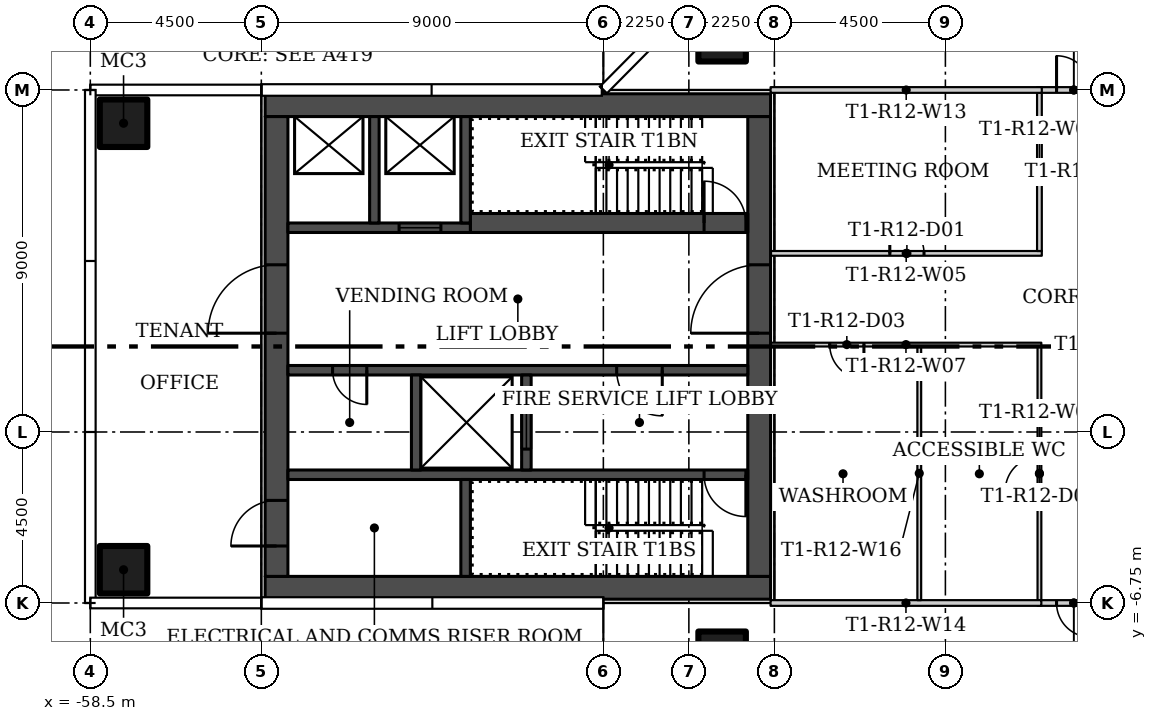
"""IFC4 building model, lengths in metres.
Left out: names, types, materials, properties, quantities, classifications, styles, units other than length and angle.
Written with IfcOpenShell. Run it as: python <this file> out.ifc"""

import sys

from ifc_helpers import new_model, si_unit, direction, frame, frame_2d, origin, origin_2d, place, context, subcontext, project, spatial, rectangle, hollow_rectangle, extrude, element, fill, save


model = new_model("IFC4")
c1 = context("Model", 3, precision=1e-05, world=origin(), true_north=direction((0.0, 1.0)))
c2 = subcontext(c1, "Body", "Model", "MODEL_VIEW")
j1 = project(units=[si_unit("LENGTHUNIT", "METRE"), si_unit("PLANEANGLEUNIT", "RADIAN")], contexts=[c1])
p1 = place(None, origin())
s1 = spatial("IfcSite", under=j1, at=p1, CompositionType="ELEMENT")
p2 = place(p1, origin())
s2 = spatial("IfcBuilding", under=s1, at=p2, CompositionType="ELEMENT")
p3 = place(p2, frame((0.0, 0.0, 113.1)))
s3 = spatial("IfcBuildingStorey", under=s2, at=p3, CompositionType="ELEMENT", Elevation=113.1)
for number, where in (
    (1, (-41.875, 8.125, 0.0)),
    (2, (-41.875, -8.125, 0.0)),
    (3, (-57.625, -5.875, 0.0)),
    (4, (-57.625, 5.875, 0.0)),
):
    element("IfcColumn", number, at=place(p3, frame(where)), inside=s3, PredefinedType="COLUMN", context=c2, shape_type="SweptSolid", body=[
        extrude(hollow_rectangle(XDim=1.25, YDim=1.25, WallThickness=0.05, at=origin_2d()), origin(), (0.0, 0.0, 1.0), 3.55),
    ])
p4 = place(p3, frame((-40.6, 2.45, 0.0)))
e5 = element("IfcWall", 5, at=p4, inside=s3, PredefinedType="PARTITIONING", context=c2, shape_type="SweptSolid", body=[
    extrude(rectangle(XDim=7.137, YDim=0.125, at=frame_2d((3.569, 0.0))), origin(), (0.0, 0.0, 1.0), 3.55),
])
p5 = place(p4, frame((3.137, 0.0, 0.0)))
e6 = element("IfcOpeningElement", 6, at=p5, cuts=e5, PredefinedType="OPENING", context=c2, shape_type="SweptSolid", body=[
    extrude(rectangle(XDim=0.9, YDim=2.1, at=frame_2d((0.45, 1.05))), frame((0.0, 0.073, 0.0), z_axis=(0.0, -1.0, 0.0), x_axis=(1.0, 0.0, 0.0)), (0.0, 0.0, 1.0), 0.145),
])
p6 = place(p3, frame((-33.525, 2.513, 0.0), z_axis=(0.0, 0.0, 1.0), x_axis=(0.0, 1.0, 0.0)))
e7 = element("IfcWall", 7, at=p6, inside=s3, PredefinedType="PARTITIONING", context=c2, shape_type="SweptSolid", body=[
    extrude(rectangle(XDim=4.162, YDim=0.125, at=frame_2d((2.081, 0.0))), origin(), (0.0, 0.0, 1.0), 3.55),
])
p7 = place(p3, frame((-33.475, 0.05, 0.0), z_axis=(0.0, 0.0, 1.0), x_axis=(-1.0, 0.0, 0.0)))
e8 = element("IfcWall", 8, at=p7, inside=s3, PredefinedType="PARTITIONING", context=c2, shape_type="SweptSolid", body=[
    extrude(rectangle(XDim=7.125, YDim=0.1, at=frame_2d((3.562, 0.0))), origin(), (0.0, 0.0, 1.0), 3.55),
])
p8 = place(p7, frame((4.668, 0.0, 0.0)))
e9 = element("IfcOpeningElement", 9, at=p8, cuts=e8, PredefinedType="OPENING", context=c2, shape_type="SweptSolid", body=[
    extrude(rectangle(XDim=0.9, YDim=2.1, at=frame_2d((0.45, 1.05))), frame((0.0, 0.06, 0.0), z_axis=(0.0, -1.0, 0.0), x_axis=(1.0, 0.0, 0.0)), (0.0, 0.0, 1.0), 0.12),
])
p9 = place(p3, frame((-33.525, -6.675, 0.0), z_axis=(0.0, 0.0, 1.0), x_axis=(0.0, 1.0, 0.0)))
e10 = element("IfcWall", 10, at=p9, inside=s3, PredefinedType="PARTITIONING", context=c2, shape_type="SweptSolid", body=[
    extrude(rectangle(XDim=6.675, YDim=0.1, at=frame_2d((3.337, 0.0))), origin(), (0.0, 0.0, 1.0), 3.55),
])
p10 = place(p9, frame((2.875, 0.0, 0.0)))
e11 = element("IfcOpeningElement", 11, at=p10, cuts=e10, PredefinedType="OPENING", context=c2, shape_type="SweptSolid", body=[
    extrude(rectangle(XDim=0.9, YDim=2.1, at=frame_2d((0.45, 1.05))), frame((0.0, 0.06, 0.0), z_axis=(0.0, -1.0, 0.0), x_axis=(1.0, 0.0, 0.0)), (0.0, 0.0, 1.0), 0.12),
])
p11 = place(p3, frame((-33.588, 6.75, 0.0)))
e12 = element("IfcWall", 12, at=p11, inside=s3, PredefinedType="PARTITIONING", context=c2, shape_type="SweptSolid", body=[
    extrude(rectangle(XDim=1.938, YDim=0.15, at=frame_2d((0.969, 0.0))), origin(), (0.0, 0.0, 1.0), 3.55),
])
p12 = place(p11, frame((0.513, 0.0, 0.0)))
e13 = element("IfcOpeningElement", 13, at=p12, cuts=e12, PredefinedType="OPENING", context=c2, shape_type="SweptSolid", body=[
    extrude(rectangle(XDim=0.9, YDim=2.1, at=frame_2d((0.45, 1.05))), frame((0.0, 0.085, 0.0), z_axis=(0.0, -1.0, 0.0), x_axis=(1.0, 0.0, 0.0)), (0.0, 0.0, 1.0), 0.17),
])
p13 = place(p3, frame((-31.662, -6.75, 0.0), z_axis=(0.0, 0.0, 1.0), x_axis=(-1.0, 0.0, 0.0)))
e14 = element("IfcWall", 14, at=p13, inside=s3, PredefinedType="PARTITIONING", context=c2, shape_type="SweptSolid", body=[
    extrude(rectangle(XDim=1.913, YDim=0.15, at=frame_2d((0.957, 0.0))), origin(), (0.0, 0.0, 1.0), 3.55),
])
p14 = place(p13, frame((0.513, 0.0, 0.0)))
e15 = element("IfcOpeningElement", 15, at=p14, cuts=e14, PredefinedType="OPENING", context=c2, shape_type="SweptSolid", body=[
    extrude(rectangle(XDim=0.9, YDim=2.1, at=frame_2d((0.45, 1.05))), frame((0.0, 0.085, 0.0), z_axis=(0.0, -1.0, 0.0), x_axis=(1.0, 0.0, 0.0)), (0.0, 0.0, 1.0), 0.17),
])
p15 = place(p3, frame((-33.463, 6.75, 0.0), z_axis=(0.0, 0.0, 1.0), x_axis=(-1.0, 0.0, 0.0)))
e16 = element("IfcWall", 16, at=p15, inside=s3, PredefinedType="PARTITIONING", context=c2, shape_type="SweptSolid", body=[
    extrude(rectangle(XDim=7.137, YDim=0.15, at=frame_2d((3.569, 0.0))), origin(), (0.0, 0.0, 1.0), 3.55),
])
p16 = place(p3, frame((-40.6, -6.75, 0.0)))
e17 = element("IfcWall", 17, at=p16, inside=s3, PredefinedType="PARTITIONING", context=c2, shape_type="SweptSolid", body=[
    extrude(rectangle(XDim=7.125, YDim=0.15, at=frame_2d((3.562, 0.0))), origin(), (0.0, 0.0, 1.0), 3.55),
])
p17 = place(p3, frame((-36.688, -6.675, 0.0), z_axis=(0.0, 0.0, 1.0), x_axis=(0.0, 1.0, 0.0)))
e18 = element("IfcWall", 18, at=p17, inside=s3, PredefinedType="PARTITIONING", context=c2, shape_type="SweptSolid", body=[
    extrude(rectangle(XDim=6.675, YDim=0.1, at=frame_2d((3.337, 0.0))), origin(), (0.0, 0.0, 1.0), 3.55),
])
for number, where, z_axis, x_axis in (
    (19, (-40.6, -6.35, 0.0), (0.0, 0.0, 1.0), (-1.0, 0.0, 0.0)),
    (20, (-40.6, 6.35, 0.0), (0.0, 0.0, 1.0), (-1.0, 0.0, 0.0)),
):
    element("IfcWall", number, at=place(p3, frame(where, z_axis=z_axis, x_axis=x_axis)), inside=s3, PredefinedType="SHEAR", context=c2, shape_type="SweptSolid", body=[
        extrude(rectangle(XDim=13.3, YDim=0.6, at=frame_2d((6.65, 0.0))), origin(), (0.0, 0.0, 1.0), 3.55),
    ])
p18 = place(p3, frame((-40.9, -6.05, 0.0), z_axis=(0.0, 0.0, 1.0), x_axis=(0.0, 1.0, 0.0)))
e21 = element("IfcWall", 21, at=p18, inside=s3, PredefinedType="SHEAR", context=c2, shape_type="SweptSolid", body=[
    extrude(rectangle(XDim=12.1, YDim=0.6, at=frame_2d((6.05, 0.0))), origin(), (0.0, 0.0, 1.0), 3.55),
])
p19 = place(p18, frame((6.4, 0.0, 0.0)))
e22 = element("IfcOpeningElement", 22, at=p19, cuts=e21, PredefinedType="OPENING", context=c2, shape_type="SweptSolid", body=[
    extrude(rectangle(XDim=1.8, YDim=2.4, at=frame_2d((0.9, 1.2))), frame((0.0, 0.31, 0.0), z_axis=(0.0, -1.0, 0.0), x_axis=(1.0, 0.0, 0.0)), (0.0, 0.0, 1.0), 0.62),
])
p20 = place(p3, frame((-53.6, -6.05, 0.0), z_axis=(0.0, 0.0, 1.0), x_axis=(0.0, 1.0, 0.0)))
e23 = element("IfcWall", 23, at=p20, inside=s3, PredefinedType="SHEAR", context=c2, shape_type="SweptSolid", body=[
    extrude(rectangle(XDim=12.1, YDim=0.6, at=frame_2d((6.05, 0.0))), origin(), (0.0, 0.0, 1.0), 3.55),
])
p21 = place(p20, frame((0.8, 0.0, 0.0)))
e24 = element("IfcOpeningElement", 24, at=p21, cuts=e23, PredefinedType="OPENING", context=c2, shape_type="SweptSolid", body=[
    extrude(rectangle(XDim=1.2, YDim=2.1, at=frame_2d((0.6, 1.05))), frame((0.0, 0.31, 0.0), z_axis=(0.0, -1.0, 0.0), x_axis=(1.0, 0.0, 0.0)), (0.0, 0.0, 1.0), 0.62),
])
p22 = place(p20, frame((6.4, 0.0, 0.0)))
e25 = element("IfcOpeningElement", 25, at=p22, cuts=e23, PredefinedType="OPENING", context=c2, shape_type="SweptSolid", body=[
    extrude(rectangle(XDim=1.8, YDim=2.4, at=frame_2d((0.9, 1.2))), frame((0.0, 0.31, 0.0), z_axis=(0.0, -1.0, 0.0), x_axis=(1.0, 0.0, 0.0)), (0.0, 0.0, 1.0), 0.62),
])
p23 = place(p3, frame((-41.2, -3.375, 0.0), z_axis=(0.0, 0.0, 1.0), x_axis=(-1.0, 0.0, 0.0)))
e26 = element("IfcWall", 26, at=p23, inside=s3, PredefinedType="SHEAR", context=c2, shape_type="SweptSolid", body=[
    extrude(rectangle(XDim=12.1, YDim=0.25, at=frame_2d((6.05, 0.0))), origin(), (0.0, 0.0, 1.0), 3.55),
])
p24 = place(p23, frame((0.05, 0.0, 0.0)))
e27 = element("IfcOpeningElement", 27, at=p24, cuts=e26, PredefinedType="OPENING", context=c2, shape_type="SweptSolid", body=[
    extrude(rectangle(XDim=1.1, YDim=2.1, at=frame_2d((0.55, 1.05))), frame((0.0, 0.135, 0.0), z_axis=(0.0, -1.0, 0.0), x_axis=(1.0, 0.0, 0.0)), (0.0, 0.0, 1.0), 0.27),
])
p25 = place(p3, frame((-48.625, -6.05, 0.0), z_axis=(0.0, 0.0, 1.0), x_axis=(0.0, 1.0, 0.0)))
e28 = element("IfcWall", 28, at=p25, inside=s3, PredefinedType="SHEAR", context=c2, shape_type="SweptSolid", body=[
    extrude(rectangle(XDim=2.55, YDim=0.25, at=frame_2d((1.275, 0.0))), origin(), (0.0, 0.0, 1.0), 3.55),
])
p26 = place(p3, frame((-41.2, -0.625, 0.0), z_axis=(0.0, 0.0, 1.0), x_axis=(-1.0, 0.0, 0.0)))
e29 = element("IfcWall", 29, at=p26, inside=s3, PredefinedType="SHEAR", context=c2, shape_type="SweptSolid", body=[
    extrude(rectangle(XDim=12.1, YDim=0.25, at=frame_2d((6.05, 0.0))), origin(), (0.0, 0.0, 1.0), 3.55),
])
p27 = place(p26, frame((2.25, 0.0, 0.0)))
e30 = element("IfcOpeningElement", 30, at=p27, cuts=e29, PredefinedType="OPENING", context=c2, shape_type="SweptSolid", body=[
    extrude(rectangle(XDim=1.2, YDim=2.1, at=frame_2d((0.6, 1.05))), frame((0.0, 0.135, 0.0), z_axis=(0.0, -1.0, 0.0), x_axis=(1.0, 0.0, 0.0)), (0.0, 0.0, 1.0), 0.27),
])
p28 = place(p26, frame((10.025, 0.0, 0.0)))
e31 = element("IfcOpeningElement", 31, at=p28, cuts=e29, PredefinedType="OPENING", context=c2, shape_type="SweptSolid", body=[
    extrude(rectangle(XDim=0.9, YDim=2.1, at=frame_2d((0.45, 1.05))), frame((0.0, 0.135, 0.0), z_axis=(0.0, -1.0, 0.0), x_axis=(1.0, 0.0, 0.0)), (0.0, 0.0, 1.0), 0.27),
])
p29 = place(p3, frame((-47.025, -3.25, 0.0), z_axis=(0.0, 0.0, 1.0), x_axis=(0.0, 1.0, 0.0)))
e32 = element("IfcWall", 32, at=p29, inside=s3, PredefinedType="SHEAR", context=c2, shape_type="SweptSolid", body=[
    extrude(rectangle(XDim=2.5, YDim=0.25, at=frame_2d((1.25, 0.0))), origin(), (0.0, 0.0, 1.0), 3.55),
])
p30 = place(p29, frame((0.55, 0.0, 0.0)))
e33 = element("IfcOpeningElement", 33, at=p30, cuts=e32, PredefinedType="OPENING", context=c2, shape_type="SweptSolid", body=[
    extrude(rectangle(XDim=1.4, YDim=2.4, at=frame_2d((0.7, 1.2))), frame((0.0, 0.135, 0.0), z_axis=(0.0, -1.0, 0.0), x_axis=(1.0, 0.0, 0.0)), (0.0, 0.0, 1.0), 0.27),
])
p31 = place(p3, frame((-49.925, -3.25, 0.0), z_axis=(0.0, 0.0, 1.0), x_axis=(0.0, 1.0, 0.0)))
e34 = element("IfcWall", 34, at=p31, inside=s3, PredefinedType="SHEAR", context=c2, shape_type="SweptSolid", body=[
    extrude(rectangle(XDim=2.5, YDim=0.25, at=frame_2d((1.25, 0.0))), origin(), (0.0, 0.0, 1.0), 3.55),
])
p32 = place(p3, frame((-48.5, 3.25, 0.0)))
e35 = element("IfcWall", 35, at=p32, inside=s3, PredefinedType="SHEAR", context=c2, shape_type="SweptSolid", body=[
    extrude(rectangle(XDim=7.3, YDim=0.5, at=frame_2d((3.65, 0.0))), origin(), (0.0, 0.0, 1.0), 3.55),
])
p33 = place(p32, frame((6.15, 0.0, 0.0)))
e36 = element("IfcOpeningElement", 36, at=p33, cuts=e35, PredefinedType="OPENING", context=c2, shape_type="SweptSolid", body=[
    extrude(rectangle(XDim=1.1, YDim=2.1, at=frame_2d((0.55, 1.05))), frame((0.0, 0.26, 0.0), z_axis=(0.0, -1.0, 0.0), x_axis=(1.0, 0.0, 0.0)), (0.0, 0.0, 1.0), 0.52),
])
p34 = place(p3, frame((-48.5, 3.125, 0.0), z_axis=(0.0, 0.0, 1.0), x_axis=(-1.0, 0.0, 0.0)))
e37 = element("IfcWall", 37, at=p34, inside=s3, PredefinedType="SHEAR", context=c2, shape_type="SweptSolid", body=[
    extrude(rectangle(XDim=4.8, YDim=0.25, at=frame_2d((2.4, 0.0))), origin(), (0.0, 0.0, 1.0), 3.55),
])
p35 = place(p34, frame((0.775, 0.0, 0.0)))
e38 = element("IfcOpeningElement", 38, at=p35, cuts=e37, PredefinedType="OPENING", context=c2, shape_type="SweptSolid", body=[
    extrude(rectangle(XDim=1.1, YDim=2.1, at=frame_2d((0.55, 1.05))), frame((0.0, 0.135, 0.0), z_axis=(0.0, -1.0, 0.0), x_axis=(1.0, 0.0, 0.0)), (0.0, 0.0, 1.0), 0.27),
])
for number, where, z_axis, x_axis in (
    (39, (-48.625, 3.25, 0.0), (0.0, 0.0, 1.0), (0.0, 1.0, 0.0)),
    (40, (-51.025, 3.25, 0.0), (0.0, 0.0, 1.0), (0.0, 1.0, 0.0)),
):
    element("IfcWall", number, at=place(p3, frame(where, z_axis=z_axis, x_axis=x_axis)), inside=s3, PredefinedType="SHEAR", context=c2, shape_type="SweptSolid", body=[
        extrude(rectangle(XDim=2.8, YDim=0.25, at=frame_2d((1.4, 0.0))), origin(), (0.0, 0.0, 1.0), 3.55),
    ])
p36 = place(p5, origin())
e41 = element("IfcDoor", 41, at=p36, inside=s3, OperationType="SINGLE_SWING_LEFT", PredefinedType="DOOR", context=c2, shape_type="SweptSolid", body=[
    extrude(rectangle(XDim=0.9, YDim=2.1, at=frame_2d((0.45, 1.05))), frame((0.0, 0.025, 0.0), z_axis=(0.0, -1.0, 0.0), x_axis=(1.0, 0.0, 0.0)), (0.0, 0.0, 1.0), 0.05),
])
fill(e6, e41)
p37 = place(p10, origin())
e42 = element("IfcDoor", 42, at=p37, inside=s3, OperationType="SINGLE_SWING_RIGHT", PredefinedType="DOOR", context=c2, shape_type="SweptSolid", body=[
    extrude(rectangle(XDim=0.9, YDim=2.1, at=frame_2d((0.45, 1.05))), frame((0.0, 0.025, 0.0), z_axis=(0.0, -1.0, 0.0), x_axis=(1.0, 0.0, 0.0)), (0.0, 0.0, 1.0), 0.05),
])
fill(e11, e42)
p38 = place(p8, origin())
e43 = element("IfcDoor", 43, at=p38, inside=s3, OperationType="SINGLE_SWING_LEFT", PredefinedType="DOOR", context=c2, shape_type="SweptSolid", body=[
    extrude(rectangle(XDim=0.9, YDim=2.1, at=frame_2d((0.45, 1.05))), frame((0.0, 0.025, 0.0), z_axis=(0.0, -1.0, 0.0), x_axis=(1.0, 0.0, 0.0)), (0.0, 0.0, 1.0), 0.05),
])
fill(e9, e43)
p39 = place(p12, origin())
e44 = element("IfcDoor", 44, at=p39, inside=s3, OperationType="SINGLE_SWING_LEFT", PredefinedType="DOOR", context=c2, shape_type="SweptSolid", body=[
    extrude(rectangle(XDim=0.9, YDim=2.1, at=frame_2d((0.45, 1.05))), frame((0.0, 0.025, 0.0), z_axis=(0.0, -1.0, 0.0), x_axis=(1.0, 0.0, 0.0)), (0.0, 0.0, 1.0), 0.05),
])
fill(e13, e44)
p40 = place(p14, origin())
e45 = element("IfcDoor", 45, at=p40, inside=s3, OperationType="SINGLE_SWING_RIGHT", PredefinedType="DOOR", context=c2, shape_type="SweptSolid", body=[
    extrude(rectangle(XDim=0.9, YDim=2.1, at=frame_2d((0.45, 1.05))), frame((0.0, 0.025, 0.0), z_axis=(0.0, -1.0, 0.0), x_axis=(1.0, 0.0, 0.0)), (0.0, 0.0, 1.0), 0.05),
])
fill(e15, e45)
p41 = place(p19, origin())
e46 = element("IfcDoor", 46, at=p41, inside=s3, OperationType="DOUBLE_DOOR_SINGLE_SWING", PredefinedType="DOOR", context=c2, shape_type="SweptSolid", body=[
    extrude(rectangle(XDim=1.8, YDim=2.4, at=frame_2d((0.9, 1.2))), frame((0.0, 0.025, 0.0), z_axis=(0.0, -1.0, 0.0), x_axis=(1.0, 0.0, 0.0)), (0.0, 0.0, 1.0), 0.05),
])
fill(e22, e46)
p42 = place(p21, origin())
e47 = element("IfcDoor", 47, at=p42, inside=s3, OperationType="SINGLE_SWING_LEFT", PredefinedType="DOOR", context=c2, shape_type="SweptSolid", body=[
    extrude(rectangle(XDim=1.2, YDim=2.1, at=frame_2d((0.6, 1.05))), frame((0.0, 0.025, 0.0), z_axis=(0.0, -1.0, 0.0), x_axis=(1.0, 0.0, 0.0)), (0.0, 0.0, 1.0), 0.05),
])
fill(e24, e47)
p43 = place(p22, origin())
e48 = element("IfcDoor", 48, at=p43, inside=s3, OperationType="DOUBLE_DOOR_SINGLE_SWING", PredefinedType="DOOR", context=c2, shape_type="SweptSolid", body=[
    extrude(rectangle(XDim=1.8, YDim=2.4, at=frame_2d((0.9, 1.2))), frame((0.0, 0.025, 0.0), z_axis=(0.0, -1.0, 0.0), x_axis=(1.0, 0.0, 0.0)), (0.0, 0.0, 1.0), 0.05),
])
fill(e25, e48)
p44 = place(p24, origin())
e49 = element("IfcDoor", 49, at=p44, inside=s3, OperationType="SINGLE_SWING_LEFT", PredefinedType="DOOR", context=c2, shape_type="SweptSolid", body=[
    extrude(rectangle(XDim=1.1, YDim=2.1, at=frame_2d((0.55, 1.05))), frame((0.0, 0.025, 0.0), z_axis=(0.0, -1.0, 0.0), x_axis=(1.0, 0.0, 0.0)), (0.0, 0.0, 1.0), 0.05),
])
fill(e27, e49)
p45 = place(p27, origin())
e50 = element("IfcDoor", 50, at=p45, inside=s3, OperationType="SINGLE_SWING_LEFT", PredefinedType="DOOR", context=c2, shape_type="SweptSolid", body=[
    extrude(rectangle(XDim=1.2, YDim=2.1, at=frame_2d((0.6, 1.05))), frame((0.0, 0.025, 0.0), z_axis=(0.0, -1.0, 0.0), x_axis=(1.0, 0.0, 0.0)), (0.0, 0.0, 1.0), 0.05),
])
fill(e30, e50)
p46 = place(p28, origin())
e51 = element("IfcDoor", 51, at=p46, inside=s3, OperationType="SINGLE_SWING_RIGHT", PredefinedType="DOOR", context=c2, shape_type="SweptSolid", body=[
    extrude(rectangle(XDim=0.9, YDim=2.1, at=frame_2d((0.45, 1.05))), frame((0.0, 0.025, 0.0), z_axis=(0.0, -1.0, 0.0), x_axis=(1.0, 0.0, 0.0)), (0.0, 0.0, 1.0), 0.05),
])
fill(e31, e51)
p47 = place(p30, origin())
e52 = element("IfcDoor", 52, at=p47, inside=s3, OperationType="SLIDING_TO_LEFT", PredefinedType="DOOR", context=c2, shape_type="SweptSolid", body=[
    extrude(rectangle(XDim=1.4, YDim=2.4, at=frame_2d((0.7, 1.2))), frame((0.0, 0.025, 0.0), z_axis=(0.0, -1.0, 0.0), x_axis=(1.0, 0.0, 0.0)), (0.0, 0.0, 1.0), 0.05),
])
fill(e33, e52)
p48 = place(p33, origin())
e53 = element("IfcDoor", 53, at=p48, inside=s3, OperationType="SINGLE_SWING_RIGHT", PredefinedType="DOOR", context=c2, shape_type="SweptSolid", body=[
    extrude(rectangle(XDim=1.1, YDim=2.1, at=frame_2d((0.55, 1.05))), frame((0.0, 0.025, 0.0), z_axis=(0.0, -1.0, 0.0), x_axis=(1.0, 0.0, 0.0)), (0.0, 0.0, 1.0), 0.05),
])
fill(e36, e53)
p49 = place(p35, origin())
e54 = element("IfcDoor", 54, at=p49, inside=s3, OperationType="SLIDING_TO_LEFT", PredefinedType="DOOR", context=c2, shape_type="SweptSolid", body=[
    extrude(rectangle(XDim=1.1, YDim=2.1, at=frame_2d((0.55, 1.05))), frame((0.0, 0.025, 0.0), z_axis=(0.0, -1.0, 0.0), x_axis=(1.0, 0.0, 0.0)), (0.0, 0.0, 1.0), 0.05),
])
fill(e38, e54)
save(model, sys.argv[1])
